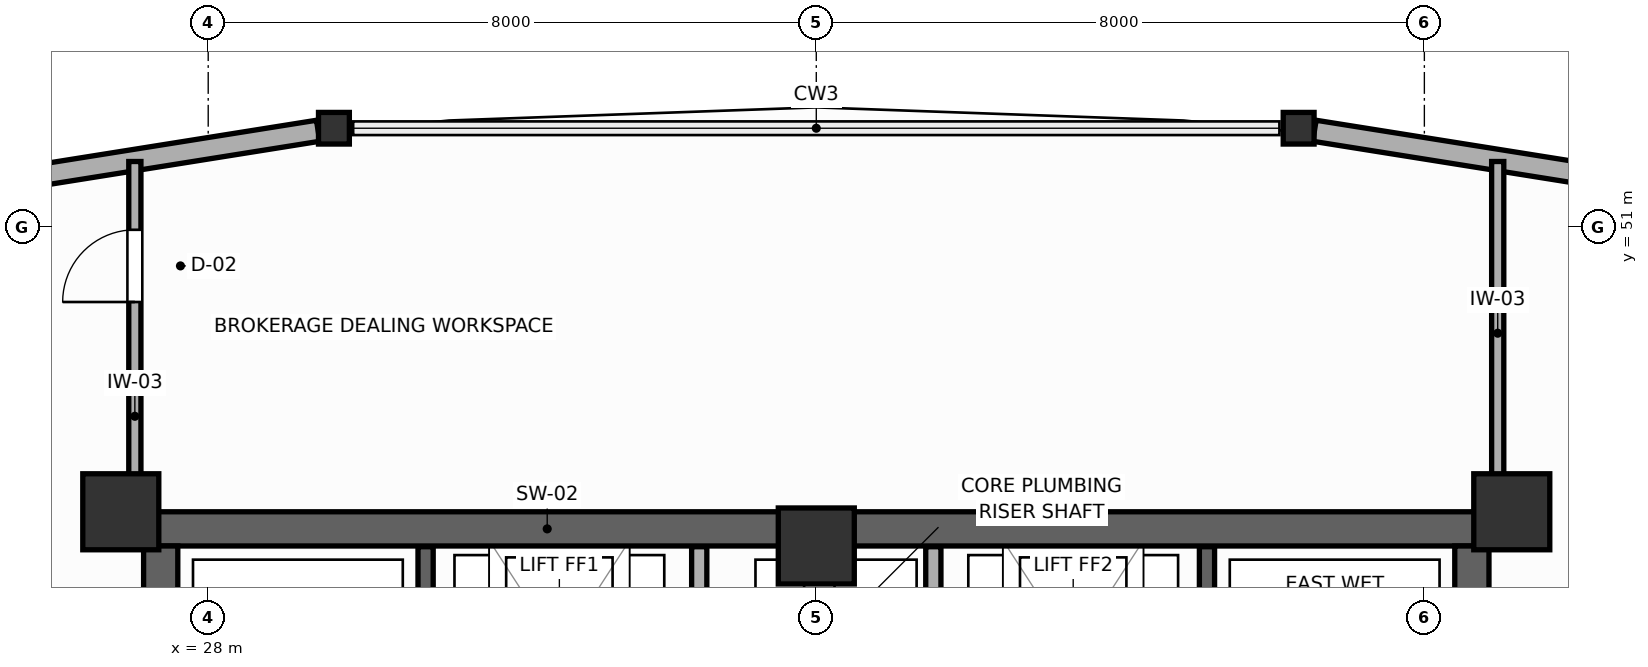
"""IFC4 building model, lengths in metres.
Left out: names, types, materials, properties, quantities, classifications, styles, units other than length and angle.
Written with IfcOpenShell. Run it as: python <this file> out.ifc"""

import sys

from ifc_helpers import new_model, si_unit, direction, frame, frame_2d, origin, origin_2d, place, context, subcontext, project, spatial, rectangle, i_section, extrude, source, transform, mapped, element, fill, save


model = new_model("IFC4")
c1 = context("Model", 3, precision=1e-05, world=origin(), true_north=direction((0.0, 1.0)))
c2 = subcontext(c1, "Body", "Model", "MODEL_VIEW")
j1 = project(units=[si_unit("LENGTHUNIT", "METRE"), si_unit("PLANEANGLEUNIT", "RADIAN")], contexts=[c1])
p1 = place(None, origin())
s1 = spatial("IfcSite", under=j1, at=p1, CompositionType="ELEMENT")
p2 = place(p1, origin())
s2 = spatial("IfcBuilding", under=s1, at=p2, CompositionType="ELEMENT")
p3 = place(p2, frame((0.0, 0.0, 172.2)))
s3 = spatial("IfcBuildingStorey", under=s2, at=p3, CompositionType="ELEMENT", Elevation=172.2)
p4 = place(p3, frame((27.15, 47.025, 0.0), z_axis=(0.0, 0.0, 1.0), x_axis=(1.0, 0.0, 0.0)))
e1 = element("IfcWall", 1, at=p4, inside=s3, PredefinedType="SHEAR", context=c2, shape_type="SweptSolid", body=[
    extrude(rectangle(XDim=17.7, YDim=0.45, at=frame_2d((8.85, 0.0))), origin(), (0.0, 0.0, 1.0), 3.6),
])
for number, where, z_axis, x_axis in (
    (2, (27.375, 37.8, 0.0), (0.0, 0.0, 1.0), (0.0, 1.0, 0.0)),
    (3, (44.625, 37.8, 0.0), (0.0, 0.0, 1.0), (0.0, 1.0, 0.0)),
):
    element("IfcWall", number, at=place(p3, frame(where, z_axis=z_axis, x_axis=x_axis)), inside=s3, PredefinedType="SHEAR", context=c2, shape_type="SweptSolid", body=[
        extrude(rectangle(XDim=9.0, YDim=0.45, at=frame_2d((4.5, 0.0))), origin(), (0.0, 0.0, 1.0), 3.6),
    ])
m1 = source(origin(), c2, "Body", "SweptSolid", [
    extrude(rectangle(XDim=1.0, YDim=1.0, at=origin_2d()), origin(), (0.0, 0.0, 1.0), 3.6),
])
for number, where, z_axis, x_axis in (
    (4, (26.85, 47.25, 0.0), (0.0, 0.0, 1.0), (1.0, 0.0, 0.0)),
    (5, (45.15, 47.25, 0.0), (0.0, 0.0, 1.0), (1.0, 0.0, 0.0)),
    (6, (36.0, 46.8, 0.0), (0.0, 0.0, 1.0), (1.0, 0.0, 0.0)),
):
    element("IfcColumn", number, at=place(p3, frame(where, z_axis=z_axis, x_axis=x_axis)), inside=s3, PredefinedType="COLUMN", context=c2, shape_type="MappedRepresentation", body=[
        mapped(m1, transform((0.0, 0.0, 0.0), scale=1.0)),
    ])
m2 = source(origin(), c2, "Body", "SweptSolid", [
    extrude(i_section(OverallWidth=0.406, OverallDepth=0.416, WebThickness=0.027, FlangeThickness=0.044, FilletRadius=0.015, at=origin_2d()), origin(), (0.0, 0.0, 1.0), 3.6),
])
for number, where, z_axis, x_axis in (
    (7, (42.346, 52.296, 0.0), (0.0, 0.0, 1.0), (1.0, 0.0, 0.0)),
    (8, (29.654, 52.296, 0.0), (0.0, 0.0, 1.0), (1.0, 0.0, 0.0)),
):
    element("IfcColumn", number, at=place(p3, frame(where, z_axis=z_axis, x_axis=x_axis)), inside=s3, PredefinedType="COLUMN", context=c2, shape_type="MappedRepresentation", body=[
        mapped(m2, transform((0.0, 0.0, 0.0), scale=1.0)),
    ])
p5 = place(p3, frame((56.694, 50.008, 0.0), z_axis=(0.0, 0.0, 1.0), x_axis=(-0.987528363291, 0.157441200757, 0.0)))
e9 = element("IfcWall", 9, at=p5, inside=s3, PredefinedType="SOLIDWALL", context=c2, shape_type="SweptSolid", body=[
    extrude(rectangle(XDim=14.319, YDim=0.28, at=frame_2d((7.159, 0.0))), origin(), (0.0, 0.0, 1.0), 3.01),
])
p6 = place(p3, frame((29.446, 52.263, 0.0), z_axis=(0.0, 0.0, 1.0), x_axis=(-0.987528363291, -0.157441200757, 0.0)))
e10 = element("IfcWall", 10, at=p6, inside=s3, PredefinedType="SOLIDWALL", context=c2, shape_type="SweptSolid", body=[
    extrude(rectangle(XDim=14.319, YDim=0.28, at=frame_2d((7.159, 0.0))), origin(), (0.0, 0.0, 1.0), 2.95),
])
p7 = place(p3, frame((30.86, 37.81, 0.0), z_axis=(0.0, 0.0, 1.0), x_axis=(0.0, 1.0, 0.0)))
e11 = element("IfcWall", 11, at=p7, inside=s3, PredefinedType="SHEAR", context=c2, shape_type="SweptSolid", body=[
    extrude(rectangle(XDim=8.98, YDim=0.2, at=frame_2d((4.49, 0.0))), origin(), (0.0, 0.0, 1.0), 3.6),
])
p8 = place(p7, frame((0.82, 0.0, 0.0)))
e12 = element("IfcOpeningElement", 12, at=p8, cuts=e11, PredefinedType="OPENING", context=c2, shape_type="SweptSolid", body=[
    extrude(rectangle(XDim=1.05, YDim=2.1, at=frame_2d((0.525, 1.05))), frame((0.0, 0.11, 0.0), z_axis=(0.0, -1.0, 0.0), x_axis=(1.0, 0.0, 0.0)), (0.0, 0.0, 1.0), 0.22),
])
p9 = place(p3, frame((41.14, 37.81, 0.0), z_axis=(0.0, 0.0, 1.0), x_axis=(0.0, 1.0, 0.0)))
e13 = element("IfcWall", 13, at=p9, inside=s3, PredefinedType="SHEAR", context=c2, shape_type="SweptSolid", body=[
    extrude(rectangle(XDim=8.98, YDim=0.2, at=frame_2d((4.49, 0.0))), origin(), (0.0, 0.0, 1.0), 3.6),
])
p10 = place(p9, frame((0.82, 0.0, 0.0)))
e14 = element("IfcOpeningElement", 14, at=p10, cuts=e13, PredefinedType="OPENING", context=c2, shape_type="SweptSolid", body=[
    extrude(rectangle(XDim=1.05, YDim=2.1, at=frame_2d((0.525, 1.05))), frame((0.0, 0.11, 0.0), z_axis=(0.0, -1.0, 0.0), x_axis=(1.0, 0.0, 0.0)), (0.0, 0.0, 1.0), 0.22),
])
p11 = place(p3, frame((34.46, 37.81, 0.0), z_axis=(0.0, 0.0, 1.0), x_axis=(0.0, 1.0, 0.0)))
e15 = element("IfcWall", 15, at=p11, inside=s3, PredefinedType="PARTITIONING", context=c2, shape_type="SweptSolid", body=[
    extrude(rectangle(XDim=8.98, YDim=0.2, at=frame_2d((4.49, 0.0))), origin(), (0.0, 0.0, 1.0), 3.4),
])
p12 = place(p11, frame((0.65, 0.0, 0.0)))
e16 = element("IfcOpeningElement", 16, at=p12, cuts=e15, PredefinedType="OPENING", context=c2, shape_type="SweptSolid", body=[
    extrude(rectangle(XDim=0.85, YDim=2.05, at=frame_2d((0.425, 1.025))), frame((0.0, 0.11, 0.0), z_axis=(0.0, -1.0, 0.0), x_axis=(1.0, 0.0, 0.0)), (0.0, 0.0, 1.0), 0.22),
])
p13 = place(p3, frame((37.54, 37.81, 0.0), z_axis=(0.0, 0.0, 1.0), x_axis=(0.0, 1.0, 0.0)))
e17 = element("IfcWall", 17, at=p13, inside=s3, PredefinedType="PARTITIONING", context=c2, shape_type="SweptSolid", body=[
    extrude(rectangle(XDim=8.98, YDim=0.2, at=frame_2d((4.49, 0.0))), origin(), (0.0, 0.0, 1.0), 3.4),
])
p14 = place(p13, frame((0.65, 0.0, 0.0)))
e18 = element("IfcOpeningElement", 18, at=p14, cuts=e17, PredefinedType="OPENING", context=c2, shape_type="SweptSolid", body=[
    extrude(rectangle(XDim=0.85, YDim=2.05, at=frame_2d((0.425, 1.025))), frame((0.0, 0.11, 0.0), z_axis=(0.0, -1.0, 0.0), x_axis=(1.0, 0.0, 0.0)), (0.0, 0.0, 1.0), 0.22),
])
p15 = place(p3, frame((27.035, 47.183, 0.0), z_axis=(0.0, 0.0, 1.0), x_axis=(0.0, 1.0, 0.0)))
e19 = element("IfcWall", 19, at=p15, inside=s3, PredefinedType="PARTITIONING", context=c2, shape_type="SweptSolid", body=[
    extrude(rectangle(XDim=4.675, YDim=0.16, at=frame_2d((2.337, 0.0))), origin(), (0.0, 0.0, 1.0), 3.4),
])
p16 = place(p15, frame((2.827, 0.0, 0.0)))
e20 = element("IfcOpeningElement", 20, at=p16, cuts=e19, PredefinedType="OPENING", context=c2, shape_type="SweptSolid", body=[
    extrude(rectangle(XDim=0.95, YDim=2.05, at=frame_2d((0.475, 1.025))), frame((0.0, 0.09, 0.0), z_axis=(0.0, -1.0, 0.0), x_axis=(1.0, 0.0, 0.0)), (0.0, 0.0, 1.0), 0.18),
])
p17 = place(p3, frame((44.965, 47.34, 0.0), z_axis=(0.0, 0.0, 1.0), x_axis=(0.0, 1.0, 0.0)))
e21 = element("IfcWall", 21, at=p17, inside=s3, PredefinedType="PARTITIONING", context=c2, shape_type="SweptSolid", body=[
    extrude(rectangle(XDim=4.518, YDim=0.16, at=frame_2d((2.259, 0.0))), origin(), (0.0, 0.0, 1.0), 3.4),
])
p18 = place(p16, origin())
e22 = element("IfcDoor", 22, at=p18, inside=s3, OperationType="SINGLE_SWING_LEFT", PredefinedType="DOOR", context=c2, shape_type="SweptSolid", body=[
    extrude(rectangle(XDim=0.95, YDim=2.05, at=frame_2d((0.475, 1.025))), frame((0.0, 0.025, 0.0), z_axis=(0.0, -1.0, 0.0), x_axis=(1.0, 0.0, 0.0)), (0.0, 0.0, 1.0), 0.05),
])
fill(e20, e22)
save(model, sys.argv[1])
